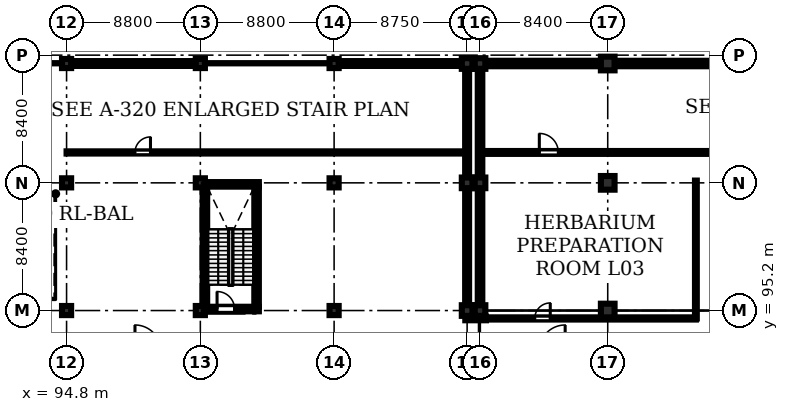
"""IFC4 building model, lengths in metres.
Left out: names, types, materials, properties, quantities, classifications, styles, units other than length and angle.
Written with IfcOpenShell. Run it as: python <this file> out.ifc"""

import sys

from ifc_helpers import new_model, si_unit, direction, frame, frame_2d, origin, origin_2d, place, context, subcontext, project, spatial, rectangle, extrude, element, fill, save


model = new_model("IFC4")
c1 = context("Model", 3, precision=1e-05, world=origin(), true_north=direction((0.0, 1.0)))
c2 = subcontext(c1, "Body", "Model", "MODEL_VIEW")
j1 = project(units=[si_unit("LENGTHUNIT", "METRE"), si_unit("PLANEANGLEUNIT", "RADIAN")], contexts=[c1])
p1 = place(None, origin())
s1 = spatial("IfcSite", under=j1, at=p1, CompositionType="ELEMENT")
p2 = place(p1, origin())
s2 = spatial("IfcBuilding", under=s1, at=p2, CompositionType="ELEMENT")
p3 = place(p2, frame((0.0, 0.0, 10.2)))
s3 = spatial("IfcBuildingStorey", under=s2, at=p3, CompositionType="ELEMENT", Elevation=10.2)
for number, where, z_axis, x_axis in (
    (1, (94.8, 95.2, 0.0), (0.0, 0.0, 1.0), (1.0, 0.0, 0.0)),
    (2, (94.8, 103.6, 0.0), (0.0, 0.0, 1.0), (1.0, 0.0, 0.0)),
    (3, (94.8, 111.45, 0.0), (0.0, 0.0, 1.0), (1.0, 0.0, 0.0)),
    (4, (103.6, 95.2, 0.0), (0.0, 0.0, 1.0), (1.0, 0.0, 0.0)),
    (5, (103.6, 103.6, 0.0), (0.0, 0.0, 1.0), (1.0, 0.0, 0.0)),
    (6, (103.6, 111.45, 0.0), (0.0, 0.0, 1.0), (1.0, 0.0, 0.0)),
    (7, (112.4, 95.2, 0.0), (0.0, 0.0, 1.0), (1.0, 0.0, 0.0)),
    (8, (112.4, 103.6, 0.0), (0.0, 0.0, 1.0), (1.0, 0.0, 0.0)),
    (9, (112.4, 111.45, 0.0), (0.0, 0.0, 1.0), (1.0, 0.0, 0.0)),
):
    element("IfcColumn", number, at=place(p3, frame(where, z_axis=z_axis, x_axis=x_axis)), inside=s3, PredefinedType="COLUMN", context=c2, shape_type="SweptSolid", body=[
        extrude(rectangle(XDim=0.6, YDim=0.6, at=origin_2d()), origin(), (0.0, 0.0, 1.0), 4.26),
    ])
for number, where, z_axis, x_axis in (
    (10, (121.15, 95.2, 0.0), (0.0, 0.0, 1.0), (1.0, 0.0, 0.0)),
    (11, (121.15, 103.6, 0.0), (0.0, 0.0, 1.0), (1.0, 0.0, 0.0)),
    (12, (121.15, 111.45, 0.0), (0.0, 0.0, 1.0), (1.0, 0.0, 0.0)),
    (13, (122.0, 95.2, 0.0), (0.0, 0.0, 1.0), (1.0, 0.0, 0.0)),
    (14, (122.0, 103.6, 0.0), (0.0, 0.0, 1.0), (1.0, 0.0, 0.0)),
    (15, (122.0, 111.45, 0.0), (0.0, 0.0, 1.0), (1.0, 0.0, 0.0)),
):
    element("IfcColumn", number, at=place(p3, frame(where, z_axis=z_axis, x_axis=x_axis)), inside=s3, PredefinedType="COLUMN", context=c2, shape_type="SweptSolid", body=[
        extrude(rectangle(XDim=0.7, YDim=0.7, at=origin_2d()), origin(), (0.0, 0.0, 1.0), 4.26),
    ])
for number, where, z_axis, x_axis in (
    (16, (130.4, 95.2, 0.0), (0.0, 0.0, 1.0), (1.0, 0.0, 0.0)),
    (17, (130.4, 103.6, 0.0), (0.0, 0.0, 1.0), (1.0, 0.0, 0.0)),
    (18, (130.4, 111.45, 0.0), (0.0, 0.0, 1.0), (1.0, 0.0, 0.0)),
):
    element("IfcColumn", number, at=place(p3, frame(where, z_axis=z_axis, x_axis=x_axis)), inside=s3, PredefinedType="COLUMN", context=c2, shape_type="SweptSolid", body=[
        extrude(rectangle(XDim=0.9, YDim=0.9, at=origin_2d()), origin(), (0.0, 0.0, 1.0), 4.26),
    ])
p4 = place(p3, frame((103.75, 95.3, 0.0), z_axis=(0.0, 0.0, 1.0), x_axis=(1.0, 0.0, 0.0)))
e19 = element("IfcWall", 19, at=p4, inside=s3, PredefinedType="SHEAR", context=c2, shape_type="SweptSolid", body=[
    extrude(rectangle(XDim=3.7, YDim=0.3, at=frame_2d((1.85, 0.0))), origin(), (0.0, 0.0, 1.0), 4.26),
])
p5 = place(p4, frame((0.95, 0.0, 0.0)))
e20 = element("IfcOpeningElement", 20, at=p5, cuts=e19, PredefinedType="OPENING", context=c2, shape_type="SweptSolid", body=[
    extrude(rectangle(XDim=1.15, YDim=2.15, at=frame_2d((0.575, 1.075))), frame((0.0, 0.16, 0.0), z_axis=(0.0, -1.0, 0.0), x_axis=(1.0, 0.0, 0.0)), (0.0, 0.0, 1.0), 0.32),
])
p6 = place(p3, frame((103.75, 103.5, 0.0), z_axis=(0.0, 0.0, 1.0), x_axis=(1.0, 0.0, 0.0)))
e21 = element("IfcWall", 21, at=p6, inside=s3, PredefinedType="SHEAR", context=c2, shape_type="SweptSolid", body=[
    extrude(rectangle(XDim=3.7, YDim=0.3, at=frame_2d((1.85, 0.0))), origin(), (0.0, 0.0, 1.0), 4.26),
])
for number, where, z_axis, x_axis in (
    (22, (103.9, 95.45, 0.0), (0.0, 0.0, 1.0), (0.0, 1.0, 0.0)),
    (23, (107.3, 95.45, 0.0), (0.0, 0.0, 1.0), (0.0, 1.0, 0.0)),
):
    element("IfcWall", number, at=place(p3, frame(where, z_axis=z_axis, x_axis=x_axis)), inside=s3, PredefinedType="SHEAR", context=c2, shape_type="SweptSolid", body=[
        extrude(rectangle(XDim=7.9, YDim=0.3, at=frame_2d((3.95, 0.0))), origin(), (0.0, 0.0, 1.0), 4.26),
    ])
p7 = place(p3, frame((95.1, 111.45, 0.0), z_axis=(0.0, 0.0, 1.0), x_axis=(1.0, 0.0, 0.0)))
e24 = element("IfcWall", 24, at=p7, inside=s3, PredefinedType="STANDARD", context=c2, shape_type="SweptSolid", body=[
    extrude(rectangle(XDim=8.2, YDim=0.32, at=frame_2d((4.1, 0.0))), origin(), (0.0, 0.0, 1.0), 3.51),
])
p8 = place(p7, frame((1.1, 0.0, 0.9)))
e25 = element("IfcOpeningElement", 25, at=p8, cuts=e24, PredefinedType="OPENING", context=c2, shape_type="SweptSolid", body=[
    extrude(rectangle(XDim=2.4, YDim=2.2, at=frame_2d((1.2, 1.1))), frame((0.0, 0.17, 0.0), z_axis=(0.0, -1.0, 0.0), x_axis=(1.0, 0.0, 0.0)), (0.0, 0.0, 1.0), 0.34),
])
p9 = place(p7, frame((4.7, 0.0, 0.9)))
e26 = element("IfcOpeningElement", 26, at=p9, cuts=e24, PredefinedType="OPENING", context=c2, shape_type="SweptSolid", body=[
    extrude(rectangle(XDim=2.4, YDim=2.2, at=frame_2d((1.2, 1.1))), frame((0.0, 0.17, 0.0), z_axis=(0.0, -1.0, 0.0), x_axis=(1.0, 0.0, 0.0)), (0.0, 0.0, 1.0), 0.34),
])
p10 = place(p3, frame((112.7, 111.45, 0.0), z_axis=(0.0, 0.0, 1.0), x_axis=(1.0, 0.0, 0.0)))
e27 = element("IfcWall", 27, at=p10, inside=s3, PredefinedType="STANDARD", context=c2, shape_type="SweptSolid", body=[
    extrude(rectangle(XDim=8.1, YDim=0.32, at=frame_2d((4.05, 0.0))), origin(), (0.0, 0.0, 1.0), 3.51),
])
p11 = place(p10, frame((1.1, 0.0, 0.9)))
e28 = element("IfcOpeningElement", 28, at=p11, cuts=e27, PredefinedType="OPENING", context=c2, shape_type="SweptSolid", body=[
    extrude(rectangle(XDim=2.4, YDim=2.2, at=frame_2d((1.2, 1.1))), frame((0.0, 0.17, 0.0), z_axis=(0.0, -1.0, 0.0), x_axis=(1.0, 0.0, 0.0)), (0.0, 0.0, 1.0), 0.34),
])
p12 = place(p10, frame((4.7, 0.0, 0.9)))
e29 = element("IfcOpeningElement", 29, at=p12, cuts=e27, PredefinedType="OPENING", context=c2, shape_type="SweptSolid", body=[
    extrude(rectangle(XDim=2.4, YDim=2.2, at=frame_2d((1.2, 1.1))), frame((0.0, 0.17, 0.0), z_axis=(0.0, -1.0, 0.0), x_axis=(1.0, 0.0, 0.0)), (0.0, 0.0, 1.0), 0.34),
])
p13 = place(p3, frame((121.15, 103.25, 0.0), z_axis=(0.0, 0.0, 1.0), x_axis=(0.0, -1.0, 0.0)))
e30 = element("IfcWall", 30, at=p13, inside=s3, PredefinedType="STANDARD", context=c2, shape_type="SweptSolid", body=[
    extrude(rectangle(XDim=7.7, YDim=0.26, at=frame_2d((3.85, 0.0))), origin(), (0.0, 0.0, 1.0), 3.61),
])
p14 = place(p3, frame((121.15, 111.1, 0.0), z_axis=(0.0, 0.0, 1.0), x_axis=(0.0, -1.0, 0.0)))
e31 = element("IfcWall", 31, at=p14, inside=s3, PredefinedType="STANDARD", context=c2, shape_type="SweptSolid", body=[
    extrude(rectangle(XDim=7.15, YDim=0.26, at=frame_2d((3.575, 0.0))), origin(), (0.0, 0.0, 1.0), 3.61),
])
p15 = place(p3, frame((122.35, 111.45, 0.0), z_axis=(0.0, 0.0, 1.0), x_axis=(1.0, 0.0, 0.0)))
e32 = element("IfcWall", 32, at=p15, inside=s3, PredefinedType="STANDARD", context=c2, shape_type="SweptSolid", body=[
    extrude(rectangle(XDim=7.6, YDim=0.36, at=frame_2d((3.8, 0.0))), origin(), (0.0, 0.0, 1.0), 3.51),
])
p16 = place(p15, frame((1.3, 0.0, 1.1)))
e33 = element("IfcOpeningElement", 33, at=p16, cuts=e32, PredefinedType="OPENING", context=c2, shape_type="SweptSolid", body=[
    extrude(rectangle(XDim=1.2, YDim=1.8, at=frame_2d((0.6, 0.9))), frame((0.0, 0.19, 0.0), z_axis=(0.0, -1.0, 0.0), x_axis=(1.0, 0.0, 0.0)), (0.0, 0.0, 1.0), 0.38),
])
p17 = place(p15, frame((5.1, 0.0, 1.1)))
e34 = element("IfcOpeningElement", 34, at=p17, cuts=e32, PredefinedType="OPENING", context=c2, shape_type="SweptSolid", body=[
    extrude(rectangle(XDim=1.2, YDim=1.8, at=frame_2d((0.6, 0.9))), frame((0.0, 0.19, 0.0), z_axis=(0.0, -1.0, 0.0), x_axis=(1.0, 0.0, 0.0)), (0.0, 0.0, 1.0), 0.38),
])
p18 = place(p3, frame((130.85, 111.45, 0.0), z_axis=(0.0, 0.0, 1.0), x_axis=(1.0, 0.0, 0.0)))
e35 = element("IfcWall", 35, at=p18, inside=s3, PredefinedType="STANDARD", context=c2, shape_type="SweptSolid", body=[
    extrude(rectangle(XDim=7.5, YDim=0.36, at=frame_2d((3.75, 0.0))), origin(), (0.0, 0.0, 1.0), 3.51),
])
p19 = place(p18, frame((1.3, 0.0, 1.1)))
e36 = element("IfcOpeningElement", 36, at=p19, cuts=e35, PredefinedType="OPENING", context=c2, shape_type="SweptSolid", body=[
    extrude(rectangle(XDim=1.2, YDim=1.8, at=frame_2d((0.6, 0.9))), frame((0.0, 0.19, 0.0), z_axis=(0.0, -1.0, 0.0), x_axis=(1.0, 0.0, 0.0)), (0.0, 0.0, 1.0), 0.38),
])
p20 = place(p18, frame((5.1, 0.0, 1.1)))
e37 = element("IfcOpeningElement", 37, at=p20, cuts=e35, PredefinedType="OPENING", context=c2, shape_type="SweptSolid", body=[
    extrude(rectangle(XDim=1.2, YDim=1.8, at=frame_2d((0.6, 0.9))), frame((0.0, 0.19, 0.0), z_axis=(0.0, -1.0, 0.0), x_axis=(1.0, 0.0, 0.0)), (0.0, 0.0, 1.0), 0.38),
])
p21 = place(p3, frame((121.03, 94.68, 0.0), z_axis=(0.0, 0.0, 1.0), x_axis=(1.0, 0.0, 0.0)))
e38 = element("IfcWall", 38, at=p21, inside=s3, PredefinedType="STANDARD", context=c2, shape_type="SweptSolid", body=[
    extrude(rectangle(XDim=1.36, YDim=0.24, at=frame_2d((0.68, 0.0))), origin(), (0.0, 0.0, 1.0), 4.26),
])
p22 = place(p3, frame((122.0, 95.55, 0.0), z_axis=(0.0, 0.0, 1.0), x_axis=(0.0, 1.0, 0.0)))
e39 = element("IfcWall", 39, at=p22, inside=s3, PredefinedType="STANDARD", context=c2, shape_type="SweptSolid", body=[
    extrude(rectangle(XDim=7.7, YDim=0.3, at=frame_2d((3.85, 0.0))), origin(), (0.0, 0.0, 1.0), 3.51),
])
p23 = place(p3, frame((122.0, 103.95, 0.0), z_axis=(0.0, 0.0, 1.0), x_axis=(0.0, 1.0, 0.0)))
e40 = element("IfcWall", 40, at=p23, inside=s3, PredefinedType="STANDARD", context=c2, shape_type="SweptSolid", body=[
    extrude(rectangle(XDim=7.15, YDim=0.3, at=frame_2d((3.575, 0.0))), origin(), (0.0, 0.0, 1.0), 3.51),
])
p24 = place(p3, frame((94.8, 105.6, 0.0), z_axis=(0.0, 0.0, 1.0), x_axis=(1.0, 0.0, 0.0)))
e41 = element("IfcWall", 41, at=p24, inside=s3, PredefinedType="PARTITIONING", context=c2, shape_type="SweptSolid", body=[
    extrude(rectangle(XDim=26.22, YDim=0.145, at=frame_2d((13.11, 0.0))), origin(), (0.0, 0.0, 1.0), 4.26),
])
p25 = place(p24, frame((4.5, 0.0, 0.0)))
e42 = element("IfcOpeningElement", 42, at=p25, cuts=e41, PredefinedType="OPENING", context=c2, shape_type="SweptSolid", body=[
    extrude(rectangle(XDim=1.02, YDim=2.15, at=frame_2d((0.51, 1.075))), frame((0.0, 0.083, 0.0), z_axis=(0.0, -1.0, 0.0), x_axis=(1.0, 0.0, 0.0)), (0.0, 0.0, 1.0), 0.165),
])
p26 = place(p3, frame((136.2, 94.68, 0.0), z_axis=(0.0, 0.0, 1.0), x_axis=(0.0, 1.0, 0.0)))
e43 = element("IfcWall", 43, at=p26, inside=s3, PredefinedType="PARTITIONING", context=c2, shape_type="SweptSolid", body=[
    extrude(rectangle(XDim=9.07, YDim=0.12, at=frame_2d((4.535, 0.0))), origin(), (0.0, 0.0, 1.0), 4.26),
])
p27 = place(p3, frame((122.4, 94.68, 0.0), z_axis=(0.0, 0.0, 1.0), x_axis=(1.0, 0.0, 0.0)))
e44 = element("IfcWall", 44, at=p27, inside=s3, PredefinedType="PARTITIONING", context=c2, shape_type="SweptSolid", body=[
    extrude(rectangle(XDim=13.8, YDim=0.145, at=frame_2d((6.9, 0.0))), origin(), (0.0, 0.0, 1.0), 4.26),
])
p28 = place(p27, frame((3.2, 0.0, 0.0)))
e45 = element("IfcOpeningElement", 45, at=p28, cuts=e44, PredefinedType="OPENING", context=c2, shape_type="SweptSolid", body=[
    extrude(rectangle(XDim=1.02, YDim=2.15, at=frame_2d((0.51, 1.075))), frame((0.0, 0.083, 0.0), z_axis=(0.0, -1.0, 0.0), x_axis=(1.0, 0.0, 0.0)), (0.0, 0.0, 1.0), 0.165),
])
p29 = place(p3, frame((122.15, 105.6, 0.0), z_axis=(0.0, 0.0, 1.0), x_axis=(1.0, 0.0, 0.0)))
e46 = element("IfcWall", 46, at=p29, inside=s3, PredefinedType="SOLIDWALL", context=c2, shape_type="SweptSolid", body=[
    extrude(rectangle(XDim=16.65, YDim=0.19, at=frame_2d((8.325, 0.0))), origin(), (0.0, 0.0, 1.0), 4.26),
])
p30 = place(p29, frame((3.75, 0.0, 0.0)))
e47 = element("IfcOpeningElement", 47, at=p30, cuts=e46, PredefinedType="OPENING", context=c2, shape_type="SweptSolid", body=[
    extrude(rectangle(XDim=1.25, YDim=2.2, at=frame_2d((0.625, 1.1))), frame((0.0, 0.105, 0.0), z_axis=(0.0, -1.0, 0.0), x_axis=(1.0, 0.0, 0.0)), (0.0, 0.0, 1.0), 0.21),
])
p31 = place(p8, origin())
e48 = element("IfcWindow", 48, at=p31, inside=s3, PartitioningType="TRIPLE_PANEL_VERTICAL", PredefinedType="WINDOW", context=c2, shape_type="SweptSolid", body=[
    extrude(rectangle(XDim=2.4, YDim=2.2, at=frame_2d((1.2, 1.1))), frame((0.0, 0.03, 0.0), z_axis=(0.0, -1.0, 0.0), x_axis=(1.0, 0.0, 0.0)), (0.0, 0.0, 1.0), 0.06),
])
fill(e25, e48)
p32 = place(p9, origin())
e49 = element("IfcWindow", 49, at=p32, inside=s3, PartitioningType="TRIPLE_PANEL_VERTICAL", PredefinedType="WINDOW", context=c2, shape_type="SweptSolid", body=[
    extrude(rectangle(XDim=2.4, YDim=2.2, at=frame_2d((1.2, 1.1))), frame((0.0, 0.03, 0.0), z_axis=(0.0, -1.0, 0.0), x_axis=(1.0, 0.0, 0.0)), (0.0, 0.0, 1.0), 0.06),
])
fill(e26, e49)
p33 = place(p11, origin())
e50 = element("IfcWindow", 50, at=p33, inside=s3, PartitioningType="TRIPLE_PANEL_VERTICAL", PredefinedType="WINDOW", context=c2, shape_type="SweptSolid", body=[
    extrude(rectangle(XDim=2.4, YDim=2.2, at=frame_2d((1.2, 1.1))), frame((0.0, 0.03, 0.0), z_axis=(0.0, -1.0, 0.0), x_axis=(1.0, 0.0, 0.0)), (0.0, 0.0, 1.0), 0.06),
])
fill(e28, e50)
p34 = place(p12, origin())
e51 = element("IfcWindow", 51, at=p34, inside=s3, PartitioningType="TRIPLE_PANEL_VERTICAL", PredefinedType="WINDOW", context=c2, shape_type="SweptSolid", body=[
    extrude(rectangle(XDim=2.4, YDim=2.2, at=frame_2d((1.2, 1.1))), frame((0.0, 0.03, 0.0), z_axis=(0.0, -1.0, 0.0), x_axis=(1.0, 0.0, 0.0)), (0.0, 0.0, 1.0), 0.06),
])
fill(e29, e51)
p35 = place(p16, origin())
e52 = element("IfcWindow", 52, at=p35, inside=s3, PartitioningType="SINGLE_PANEL", PredefinedType="WINDOW", context=c2, shape_type="SweptSolid", body=[
    extrude(rectangle(XDim=1.2, YDim=1.8, at=frame_2d((0.6, 0.9))), frame((0.0, 0.03, 0.0), z_axis=(0.0, -1.0, 0.0), x_axis=(1.0, 0.0, 0.0)), (0.0, 0.0, 1.0), 0.06),
])
fill(e33, e52)
p36 = place(p17, origin())
e53 = element("IfcWindow", 53, at=p36, inside=s3, PartitioningType="SINGLE_PANEL", PredefinedType="WINDOW", context=c2, shape_type="SweptSolid", body=[
    extrude(rectangle(XDim=1.2, YDim=1.8, at=frame_2d((0.6, 0.9))), frame((0.0, 0.03, 0.0), z_axis=(0.0, -1.0, 0.0), x_axis=(1.0, 0.0, 0.0)), (0.0, 0.0, 1.0), 0.06),
])
fill(e34, e53)
p37 = place(p19, origin())
e54 = element("IfcWindow", 54, at=p37, inside=s3, PartitioningType="SINGLE_PANEL", PredefinedType="WINDOW", context=c2, shape_type="SweptSolid", body=[
    extrude(rectangle(XDim=1.2, YDim=1.8, at=frame_2d((0.6, 0.9))), frame((0.0, 0.03, 0.0), z_axis=(0.0, -1.0, 0.0), x_axis=(1.0, 0.0, 0.0)), (0.0, 0.0, 1.0), 0.06),
])
fill(e36, e54)
p38 = place(p20, origin())
e55 = element("IfcWindow", 55, at=p38, inside=s3, PartitioningType="SINGLE_PANEL", PredefinedType="WINDOW", context=c2, shape_type="SweptSolid", body=[
    extrude(rectangle(XDim=1.2, YDim=1.8, at=frame_2d((0.6, 0.9))), frame((0.0, 0.03, 0.0), z_axis=(0.0, -1.0, 0.0), x_axis=(1.0, 0.0, 0.0)), (0.0, 0.0, 1.0), 0.06),
])
fill(e37, e55)
p39 = place(p25, origin())
e56 = element("IfcDoor", 56, at=p39, inside=s3, OperationType="SINGLE_SWING_RIGHT", PredefinedType="DOOR", context=c2, shape_type="SweptSolid", body=[
    extrude(rectangle(XDim=1.02, YDim=2.15, at=frame_2d((0.51, 1.075))), frame((0.0, 0.025, 0.0), z_axis=(0.0, -1.0, 0.0), x_axis=(1.0, 0.0, 0.0)), (0.0, 0.0, 1.0), 0.05),
])
fill(e42, e56)
p40 = place(p28, origin())
e57 = element("IfcDoor", 57, at=p40, inside=s3, OperationType="SINGLE_SWING_RIGHT", PredefinedType="DOOR", context=c2, shape_type="SweptSolid", body=[
    extrude(rectangle(XDim=1.02, YDim=2.15, at=frame_2d((0.51, 1.075))), frame((0.0, 0.025, 0.0), z_axis=(0.0, -1.0, 0.0), x_axis=(1.0, 0.0, 0.0)), (0.0, 0.0, 1.0), 0.05),
])
fill(e45, e57)
p41 = place(p30, origin())
e58 = element("IfcDoor", 58, at=p41, inside=s3, OperationType="SINGLE_SWING_LEFT", PredefinedType="DOOR", context=c2, shape_type="SweptSolid", body=[
    extrude(rectangle(XDim=1.25, YDim=2.2, at=frame_2d((0.625, 1.1))), frame((0.0, 0.025, 0.0), z_axis=(0.0, -1.0, 0.0), x_axis=(1.0, 0.0, 0.0)), (0.0, 0.0, 1.0), 0.05),
])
fill(e47, e58)
p42 = place(p5, origin())
e59 = element("IfcDoor", 59, at=p42, inside=s3, OperationType="SINGLE_SWING_LEFT", PredefinedType="DOOR", context=c2, shape_type="SweptSolid", body=[
    extrude(rectangle(XDim=1.15, YDim=2.15, at=frame_2d((0.575, 1.075))), frame((0.0, 0.025, 0.0), z_axis=(0.0, -1.0, 0.0), x_axis=(1.0, 0.0, 0.0)), (0.0, 0.0, 1.0), 0.05),
])
fill(e20, e59)
save(model, sys.argv[1])
